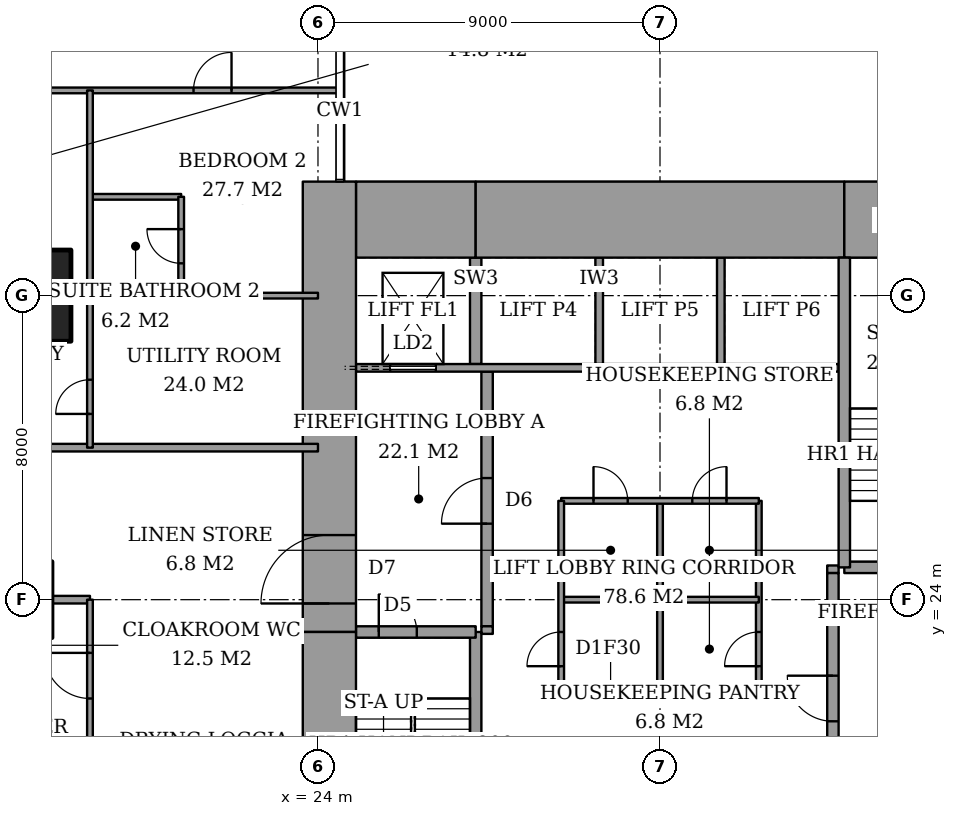
"""IFC4 building model, lengths in metres.
Left out: names, types, materials, properties, quantities, classifications, styles, units other than length and angle.
Written with IfcOpenShell. Run it as: python <this file> out.ifc"""

import sys

from ifc_helpers import new_model, si_unit, direction, frame, frame_2d, origin, origin_2d, place, context, subcontext, project, spatial, rectangle, extrude, element, fill, save


model = new_model("IFC4")
c1 = context("Model", 3, precision=1e-05, world=origin(), true_north=direction((0.0, 1.0)))
c2 = subcontext(c1, "Body", "Model", "MODEL_VIEW")
j1 = project(units=[si_unit("LENGTHUNIT", "METRE"), si_unit("PLANEANGLEUNIT", "RADIAN")], contexts=[c1])
p1 = place(None, origin())
s1 = spatial("IfcSite", under=j1, at=p1, CompositionType="ELEMENT")
p2 = place(p1, origin())
s2 = spatial("IfcBuilding", under=s1, at=p2, CompositionType="ELEMENT")
p3 = place(p2, frame((0.0, 0.0, 80.0)))
s3 = spatial("IfcBuildingStorey", under=s2, at=p3, CompositionType="ELEMENT", Elevation=80.0)
p4 = place(p3, frame((16.0, 32.0, 0.0), z_axis=(0.0, 0.0, 1.0), x_axis=(1.0, 0.0, 0.0)))
e1 = element("IfcColumn", 1, at=p4, inside=s3, PredefinedType="COLUMN", context=c2, shape_type="SweptSolid", body=[
    extrude(rectangle(XDim=3.0, YDim=2.4, at=origin_2d()), origin(), (0.0, 0.0, 1.0), 3.6),
])
p5 = place(p3, frame((25.0, 34.0, 0.0), z_axis=(0.0, 0.0, 1.0), x_axis=(1.0, 0.0, 0.0)))
e2 = element("IfcWall", 2, at=p5, inside=s3, PredefinedType="SHEAR", context=c2, shape_type="SweptSolid", body=[
    extrude(rectangle(XDim=3.15, YDim=2.0, at=frame_2d((1.575, 0.0))), origin(), (0.0, 0.0, 1.0), 3.6),
])
p6 = place(p3, frame((28.15, 34.0, 0.0), z_axis=(0.0, 0.0, 1.0), x_axis=(1.0, 0.0, 0.0)))
e3 = element("IfcWall", 3, at=p6, inside=s3, PredefinedType="SHEAR", context=c2, shape_type="SweptSolid", body=[
    extrude(rectangle(XDim=9.7, YDim=2.0, at=frame_2d((4.85, 0.0))), origin(), (0.0, 0.0, 1.0), 3.6),
])
p7 = place(p3, frame((37.85, 34.0, 0.0), z_axis=(0.0, 0.0, 1.0), x_axis=(1.0, 0.0, 0.0)))
e4 = element("IfcWall", 4, at=p7, inside=s3, PredefinedType="SHEAR", context=c2, shape_type="SweptSolid", body=[
    extrude(rectangle(XDim=3.15, YDim=2.0, at=frame_2d((1.575, 0.0))), origin(), (0.0, 0.0, 1.0), 3.6),
])
p8 = place(p3, frame((24.3, 13.0, 0.0), z_axis=(0.0, 0.0, 1.0), x_axis=(0.0, 1.0, 0.0)))
e5 = element("IfcWall", 5, at=p8, inside=s3, PredefinedType="SHEAR", context=c2, shape_type="SweptSolid", body=[
    extrude(rectangle(XDim=10.15, YDim=1.4, at=frame_2d((5.075, 0.0))), origin(), (0.0, 0.0, 1.0), 3.6),
])
p9 = place(p3, frame((24.3, 23.15, 0.0), z_axis=(0.0, 0.0, 1.0), x_axis=(0.0, 1.0, 0.0)))
e6 = element("IfcWall", 6, at=p9, inside=s3, PredefinedType="SHEAR", context=c2, shape_type="SweptSolid", body=[
    extrude(rectangle(XDim=11.85, YDim=1.4, at=frame_2d((5.925, 0.0))), origin(), (0.0, 0.0, 1.0), 3.6),
])
p10 = place(p9, frame((0.75, 0.0, 0.0)))
e7 = element("IfcOpeningElement", 7, at=p10, cuts=e6, PredefinedType="OPENING", context=c2, shape_type="SweptSolid", body=[
    extrude(rectangle(XDim=1.8, YDim=2.4, at=frame_2d((0.9, 1.2))), frame((0.0, 0.71, 0.0), z_axis=(0.0, -1.0, 0.0), x_axis=(1.0, 0.0, 0.0)), (0.0, 0.0, 1.0), 1.42),
])
p11 = place(p3, frame((28.15, 15.0, 0.0), z_axis=(0.0, 0.0, 1.0), x_axis=(0.0, 1.0, 0.0)))
e8 = element("IfcWall", 8, at=p11, inside=s3, PredefinedType="SHEAR", context=c2, shape_type="SweptSolid", body=[
    extrude(rectangle(XDim=8.15, YDim=0.3, at=frame_2d((4.075, 0.0))), origin(), (0.0, 0.0, 1.0), 3.6),
])
p12 = place(p3, frame((25.0, 23.15, 0.0), z_axis=(0.0, 0.0, 1.0), x_axis=(1.0, 0.0, 0.0)))
e9 = element("IfcWall", 9, at=p12, inside=s3, PredefinedType="SHEAR", context=c2, shape_type="SweptSolid", body=[
    extrude(rectangle(XDim=3.15, YDim=0.3, at=frame_2d((1.575, 0.0))), origin(), (0.0, 0.0, 1.0), 3.6),
])
p13 = place(p12, frame((0.6, 0.0, 0.0)))
e10 = element("IfcOpeningElement", 10, at=p13, cuts=e9, PredefinedType="OPENING", context=c2, shape_type="SweptSolid", body=[
    extrude(rectangle(XDim=1.0, YDim=2.1, at=frame_2d((0.5, 1.05))), frame((0.0, 0.16, 0.0), z_axis=(0.0, -1.0, 0.0), x_axis=(1.0, 0.0, 0.0)), (0.0, 0.0, 1.0), 0.32),
])
p14 = place(p3, frame((37.85, 24.85, 0.0), z_axis=(0.0, 0.0, 1.0), x_axis=(0.0, 1.0, 0.0)))
e11 = element("IfcWall", 11, at=p14, inside=s3, PredefinedType="SHEAR", context=c2, shape_type="SweptSolid", body=[
    extrude(rectangle(XDim=8.15, YDim=0.3, at=frame_2d((4.075, 0.0))), origin(), (0.0, 0.0, 1.0), 3.6),
])
p15 = place(p3, frame((37.85, 24.85, 0.0), z_axis=(0.0, 0.0, 1.0), x_axis=(1.0, 0.0, 0.0)))
e12 = element("IfcWall", 12, at=p15, inside=s3, PredefinedType="SHEAR", context=c2, shape_type="SweptSolid", body=[
    extrude(rectangle(XDim=3.15, YDim=0.3, at=frame_2d((1.575, 0.0))), origin(), (0.0, 0.0, 1.0), 3.6),
])
p16 = place(p15, frame((0.95, 0.0, 0.0)))
e13 = element("IfcOpeningElement", 13, at=p16, cuts=e12, PredefinedType="OPENING", context=c2, shape_type="SweptSolid", body=[
    extrude(rectangle(XDim=1.0, YDim=2.1, at=frame_2d((0.5, 1.05))), frame((0.0, 0.16, 0.0), z_axis=(0.0, -1.0, 0.0), x_axis=(1.0, 0.0, 0.0)), (0.0, 0.0, 1.0), 0.32),
])
p17 = place(p3, frame((28.45, 23.3, 0.0), z_axis=(0.0, 0.0, 1.0), x_axis=(0.0, 1.0, 0.0)))
e14 = element("IfcWall", 14, at=p17, inside=s3, PredefinedType="PARTITIONING", context=c2, shape_type="SweptSolid", body=[
    extrude(rectangle(XDim=6.7, YDim=0.3, at=frame_2d((3.35, 0.0))), origin(), (0.0, 0.0, 1.0), 3.6),
])
p18 = place(p17, frame((2.7, 0.0, 0.0)))
e15 = element("IfcOpeningElement", 15, at=p18, cuts=e14, PredefinedType="OPENING", context=c2, shape_type="SweptSolid", body=[
    extrude(rectangle(XDim=1.2, YDim=2.1, at=frame_2d((0.6, 1.05))), frame((0.0, 0.16, 0.0), z_axis=(0.0, -1.0, 0.0), x_axis=(1.0, 0.0, 0.0)), (0.0, 0.0, 1.0), 0.32),
])
p19 = place(p3, frame((37.55, 18.0, 0.0), z_axis=(0.0, 0.0, 1.0), x_axis=(0.0, 1.0, 0.0)))
e16 = element("IfcWall", 16, at=p19, inside=s3, PredefinedType="PARTITIONING", context=c2, shape_type="SweptSolid", body=[
    extrude(rectangle(XDim=6.7, YDim=0.3, at=frame_2d((3.35, 0.0))), origin(), (0.0, 0.0, 1.0), 3.6),
])
p20 = place(p19, frame((2.8, 0.0, 0.0)))
e17 = element("IfcOpeningElement", 17, at=p20, cuts=e16, PredefinedType="OPENING", context=c2, shape_type="SweptSolid", body=[
    extrude(rectangle(XDim=1.2, YDim=2.1, at=frame_2d((0.6, 1.05))), frame((0.0, 0.16, 0.0), z_axis=(0.0, -1.0, 0.0), x_axis=(1.0, 0.0, 0.0)), (0.0, 0.0, 1.0), 0.32),
])
p21 = place(p3, frame((17.0, 24.0, 0.0), z_axis=(0.0, 0.0, 1.0), x_axis=(1.0, 0.0, 0.0)))
e18 = element("IfcWall", 18, at=p21, inside=s3, PredefinedType="PARTITIONING", context=c2, shape_type="SweptSolid", body=[
    extrude(rectangle(XDim=1.0, YDim=0.2, at=frame_2d((0.5, 0.0))), origin(), (0.0, 0.0, 1.0), 3.35),
])
p22 = place(p3, frame((6.725, 28.0, 0.0), z_axis=(0.0, 0.0, 1.0), x_axis=(1.0, 0.0, 0.0)))
e19 = element("IfcWall", 19, at=p22, inside=s3, PredefinedType="PARTITIONING", context=c2, shape_type="SweptSolid", body=[
    extrude(rectangle(XDim=17.275, YDim=0.2, at=frame_2d((8.637, 0.0))), origin(), (0.0, 0.0, 1.0), 3.35),
])
p23 = place(p22, frame((6.675, 0.0, 0.0)))
e20 = element("IfcOpeningElement", 20, at=p23, cuts=e19, PredefinedType="OPENING", context=c2, shape_type="SweptSolid", body=[
    extrude(rectangle(XDim=1.2, YDim=2.4, at=frame_2d((0.6, 1.2))), frame((0.0, 0.11, 0.0), z_axis=(0.0, -1.0, 0.0), x_axis=(1.0, 0.0, 0.0)), (0.0, 0.0, 1.0), 0.22),
])
p24 = place(p3, frame((18.0, 32.0, 0.0), z_axis=(0.0, 0.0, 1.0), x_axis=(1.0, 0.0, 0.0)))
e21 = element("IfcWall", 21, at=p24, inside=s3, PredefinedType="PARTITIONING", context=c2, shape_type="SweptSolid", body=[
    extrude(rectangle(XDim=6.0, YDim=0.15, at=frame_2d((3.0, 0.0))), origin(), (0.0, 0.0, 1.0), 2.634),
])
p25 = place(p3, frame((17.5, 32.1, 0.0), z_axis=(0.0, 0.0, 1.0), x_axis=(1.0, 0.0, 0.0)))
e22 = element("IfcWall", 22, at=p25, inside=s3, PredefinedType="PARTITIONING", context=c2, shape_type="SweptSolid", body=[
    extrude(rectangle(XDim=0.5, YDim=0.15, at=frame_2d((0.25, 0.0))), origin(), (0.0, 0.0, 1.0), 2.634),
])
p26 = place(p3, frame((18.0, 34.6, 0.0), z_axis=(0.0, 0.0, 1.0), x_axis=(1.0, 0.0, 0.0)))
e23 = element("IfcWall", 23, at=p26, inside=s3, PredefinedType="PARTITIONING", context=c2, shape_type="SweptSolid", body=[
    extrude(rectangle(XDim=2.4, YDim=0.15, at=frame_2d((1.2, 0.0))), origin(), (0.0, 0.0, 1.0), 3.35),
])
p27 = place(p3, frame((10.0, 37.4, 0.0), z_axis=(0.0, 0.0, 1.0), x_axis=(1.0, 0.0, 0.0)))
e24 = element("IfcWall", 24, at=p27, inside=s3, PredefinedType="PARTITIONING", context=c2, shape_type="SweptSolid", body=[
    extrude(rectangle(XDim=14.561, YDim=0.15, at=frame_2d((7.281, 0.0))), origin(), (0.0, 0.0, 1.0), 3.35),
])
p28 = place(p27, frame((0.6, 0.0, 0.0)))
e25 = element("IfcOpeningElement", 25, at=p28, cuts=e24, PredefinedType="OPENING", context=c2, shape_type="SweptSolid", body=[
    extrude(rectangle(XDim=1.0, YDim=2.1, at=frame_2d((0.5, 1.05))), frame((0.0, 0.085, 0.0), z_axis=(0.0, -1.0, 0.0), x_axis=(1.0, 0.0, 0.0)), (0.0, 0.0, 1.0), 0.17),
])
p29 = place(p27, frame((4.6, 0.0, 0.0)))
e26 = element("IfcOpeningElement", 26, at=p29, cuts=e24, PredefinedType="OPENING", context=c2, shape_type="SweptSolid", body=[
    extrude(rectangle(XDim=1.0, YDim=2.1, at=frame_2d((0.5, 1.05))), frame((0.0, 0.085, 0.0), z_axis=(0.0, -1.0, 0.0), x_axis=(1.0, 0.0, 0.0)), (0.0, 0.0, 1.0), 0.17),
])
p30 = place(p27, frame((10.725, 0.0, 0.0)))
e27 = element("IfcOpeningElement", 27, at=p30, cuts=e24, PredefinedType="OPENING", context=c2, shape_type="SweptSolid", body=[
    extrude(rectangle(XDim=1.0, YDim=2.1, at=frame_2d((0.5, 1.05))), frame((0.0, 0.085, 0.0), z_axis=(0.0, -1.0, 0.0), x_axis=(1.0, 0.0, 0.0)), (0.0, 0.0, 1.0), 0.17),
])
p31 = place(p3, frame((18.0, 10.6, 0.0), z_axis=(0.0, 0.0, 1.0), x_axis=(0.0, 1.0, 0.0)))
e28 = element("IfcWall", 28, at=p31, inside=s3, PredefinedType="PARTITIONING", context=c2, shape_type="SweptSolid", body=[
    extrude(rectangle(XDim=13.4, YDim=0.15, at=frame_2d((6.7, 0.0))), origin(), (0.0, 0.0, 1.0), 3.35),
])
p32 = place(p31, frame((10.8, 0.0, 0.0)))
e29 = element("IfcOpeningElement", 29, at=p32, cuts=e28, PredefinedType="OPENING", context=c2, shape_type="SweptSolid", body=[
    extrude(rectangle(XDim=1.2, YDim=2.4, at=frame_2d((0.6, 1.2))), frame((0.0, 0.085, 0.0), z_axis=(0.0, -1.0, 0.0), x_axis=(1.0, 0.0, 0.0)), (0.0, 0.0, 1.0), 0.17),
])
p33 = place(p31, frame((7.25, 0.0, 0.0)))
e30 = element("IfcOpeningElement", 30, at=p33, cuts=e28, PredefinedType="OPENING", context=c2, shape_type="SweptSolid", body=[
    extrude(rectangle(XDim=0.9, YDim=2.1, at=frame_2d((0.45, 1.05))), frame((0.0, 0.085, 0.0), z_axis=(0.0, -1.0, 0.0), x_axis=(1.0, 0.0, 0.0)), (0.0, 0.0, 1.0), 0.17),
])
p34 = place(p3, frame((18.0, 28.0, 0.0), z_axis=(0.0, 0.0, 1.0), x_axis=(0.0, 1.0, 0.0)))
e31 = element("IfcWall", 31, at=p34, inside=s3, PredefinedType="PARTITIONING", context=c2, shape_type="SweptSolid", body=[
    extrude(rectangle(XDim=9.4, YDim=0.15, at=frame_2d((4.7, 0.0))), origin(), (0.0, 0.0, 1.0), 3.35),
])
p35 = place(p34, frame((0.887, 0.0, 0.0)))
e32 = element("IfcOpeningElement", 32, at=p35, cuts=e31, PredefinedType="OPENING", context=c2, shape_type="SweptSolid", body=[
    extrude(rectangle(XDim=0.9, YDim=2.1, at=frame_2d((0.45, 1.05))), frame((0.0, 0.085, 0.0), z_axis=(0.0, -1.0, 0.0), x_axis=(1.0, 0.0, 0.0)), (0.0, 0.0, 1.0), 0.17),
])
p36 = place(p3, frame((20.4, 32.0, 0.0), z_axis=(0.0, 0.0, 1.0), x_axis=(0.0, 1.0, 0.0)))
e33 = element("IfcWall", 33, at=p36, inside=s3, PredefinedType="PARTITIONING", context=c2, shape_type="SweptSolid", body=[
    extrude(rectangle(XDim=2.6, YDim=0.15, at=frame_2d((1.3, 0.0))), origin(), (0.0, 0.0, 1.0), 3.35),
])
p37 = place(p36, frame((0.85, 0.0, 0.0)))
e34 = element("IfcOpeningElement", 34, at=p37, cuts=e33, PredefinedType="OPENING", context=c2, shape_type="SweptSolid", body=[
    extrude(rectangle(XDim=0.9, YDim=2.1, at=frame_2d((0.45, 1.05))), frame((0.0, 0.085, 0.0), z_axis=(0.0, -1.0, 0.0), x_axis=(1.0, 0.0, 0.0)), (0.0, 0.0, 1.0), 0.17),
])
p38 = place(p3, frame((25.0, 30.1, 0.0), z_axis=(0.0, 0.0, 1.0), x_axis=(1.0, 0.0, 0.0)))
e35 = element("IfcWall", 35, at=p38, inside=s3, PredefinedType="PARTITIONING", context=c2, shape_type="SweptSolid", body=[
    extrude(rectangle(XDim=12.7, YDim=0.2, at=frame_2d((6.35, 0.0))), origin(), (0.0, 0.0, 1.0), 3.6),
])
p39 = place(p38, frame((0.9, 0.0, 0.0)))
e36 = element("IfcOpeningElement", 36, at=p39, cuts=e35, PredefinedType="OPENING", context=c2, shape_type="SweptSolid", body=[
    extrude(rectangle(XDim=1.2, YDim=2.1, at=frame_2d((0.6, 1.05))), frame((0.0, 0.11, 0.0), z_axis=(0.0, -1.0, 0.0), x_axis=(1.0, 0.0, 0.0)), (0.0, 0.0, 1.0), 0.22),
])
for number, where, z_axis, x_axis in (
    (37, (31.4, 30.2, 0.0), (0.0, 0.0, 1.0), (0.0, 1.0, 0.0)),
    (38, (34.6, 30.2, 0.0), (0.0, 0.0, 1.0), (0.0, 1.0, 0.0)),
):
    element("IfcWall", number, at=place(p3, frame(where, z_axis=z_axis, x_axis=x_axis)), inside=s3, PredefinedType="PARTITIONING", context=c2, shape_type="SweptSolid", body=[
        extrude(rectangle(XDim=2.8, YDim=0.2, at=frame_2d((1.4, 0.0))), origin(), (0.0, 0.0, 1.0), 3.6),
    ])
p40 = place(p3, frame((28.15, 30.2, 0.0), z_axis=(0.0, 0.0, 1.0), x_axis=(0.0, 1.0, 0.0)))
e39 = element("IfcWall", 39, at=p40, inside=s3, PredefinedType="SHEAR", context=c2, shape_type="SweptSolid", body=[
    extrude(rectangle(XDim=2.8, YDim=0.3, at=frame_2d((1.4, 0.0))), origin(), (0.0, 0.0, 1.0), 3.6),
])
for number, where, z_axis, x_axis in (
    (40, (28.3, 23.2, 0.0), (0.0, 0.0, 1.0), (1.0, 0.0, 0.0)),
    (41, (37.4, 24.8, 0.0), (0.0, 0.0, 1.0), (1.0, 0.0, 0.0)),
):
    element("IfcWall", number, at=place(p3, frame(where, z_axis=z_axis, x_axis=x_axis)), inside=s3, PredefinedType="PARTITIONING", context=c2, shape_type="SweptSolid", body=[
        extrude(rectangle(XDim=0.3, YDim=0.2, at=frame_2d((0.15, 0.0))), origin(), (0.0, 0.0, 1.0), 3.6),
    ])
p41 = place(p3, frame((30.4, 21.4, 0.0), z_axis=(0.0, 0.0, 1.0), x_axis=(1.0, 0.0, 0.0)))
e42 = element("IfcWall", 42, at=p41, inside=s3, PredefinedType="PARTITIONING", context=c2, shape_type="SweptSolid", body=[
    extrude(rectangle(XDim=5.2, YDim=0.15, at=frame_2d((2.6, 0.0))), origin(), (0.0, 0.0, 1.0), 3.35),
])
p42 = place(p3, frame((30.4, 26.6, 0.0), z_axis=(0.0, 0.0, 1.0), x_axis=(1.0, 0.0, 0.0)))
e43 = element("IfcWall", 43, at=p42, inside=s3, PredefinedType="PARTITIONING", context=c2, shape_type="SweptSolid", body=[
    extrude(rectangle(XDim=5.2, YDim=0.15, at=frame_2d((2.6, 0.0))), origin(), (0.0, 0.0, 1.0), 3.35),
])
p43 = place(p42, frame((0.85, 0.0, 0.0)))
e44 = element("IfcOpeningElement", 44, at=p43, cuts=e43, PredefinedType="OPENING", context=c2, shape_type="SweptSolid", body=[
    extrude(rectangle(XDim=0.9, YDim=2.1, at=frame_2d((0.45, 1.05))), frame((0.0, 0.085, 0.0), z_axis=(0.0, -1.0, 0.0), x_axis=(1.0, 0.0, 0.0)), (0.0, 0.0, 1.0), 0.17),
])
p44 = place(p42, frame((3.45, 0.0, 0.0)))
e45 = element("IfcOpeningElement", 45, at=p44, cuts=e43, PredefinedType="OPENING", context=c2, shape_type="SweptSolid", body=[
    extrude(rectangle(XDim=0.9, YDim=2.1, at=frame_2d((0.45, 1.05))), frame((0.0, 0.085, 0.0), z_axis=(0.0, -1.0, 0.0), x_axis=(1.0, 0.0, 0.0)), (0.0, 0.0, 1.0), 0.17),
])
p45 = place(p3, frame((30.4, 21.4, 0.0), z_axis=(0.0, 0.0, 1.0), x_axis=(0.0, 1.0, 0.0)))
e46 = element("IfcWall", 46, at=p45, inside=s3, PredefinedType="PARTITIONING", context=c2, shape_type="SweptSolid", body=[
    extrude(rectangle(XDim=5.2, YDim=0.15, at=frame_2d((2.6, 0.0))), origin(), (0.0, 0.0, 1.0), 3.35),
])
p46 = place(p45, frame((0.85, 0.0, 0.0)))
e47 = element("IfcOpeningElement", 47, at=p46, cuts=e46, PredefinedType="OPENING", context=c2, shape_type="SweptSolid", body=[
    extrude(rectangle(XDim=0.9, YDim=2.1, at=frame_2d((0.45, 1.05))), frame((0.0, 0.085, 0.0), z_axis=(0.0, -1.0, 0.0), x_axis=(1.0, 0.0, 0.0)), (0.0, 0.0, 1.0), 0.17),
])
p47 = place(p3, frame((35.6, 21.4, 0.0), z_axis=(0.0, 0.0, 1.0), x_axis=(0.0, 1.0, 0.0)))
e48 = element("IfcWall", 48, at=p47, inside=s3, PredefinedType="PARTITIONING", context=c2, shape_type="SweptSolid", body=[
    extrude(rectangle(XDim=5.2, YDim=0.15, at=frame_2d((2.6, 0.0))), origin(), (0.0, 0.0, 1.0), 3.35),
])
p48 = place(p47, frame((0.85, 0.0, 0.0)))
e49 = element("IfcOpeningElement", 49, at=p48, cuts=e48, PredefinedType="OPENING", context=c2, shape_type="SweptSolid", body=[
    extrude(rectangle(XDim=0.9, YDim=2.1, at=frame_2d((0.45, 1.05))), frame((0.0, 0.085, 0.0), z_axis=(0.0, -1.0, 0.0), x_axis=(1.0, 0.0, 0.0)), (0.0, 0.0, 1.0), 0.17),
])
for number, where, z_axis, x_axis in (
    (50, (30.4, 24.0, 0.0), (0.0, 0.0, 1.0), (1.0, 0.0, 0.0)),
    (51, (33.0, 21.4, 0.0), (0.0, 0.0, 1.0), (0.0, 1.0, 0.0)),
):
    element("IfcWall", number, at=place(p3, frame(where, z_axis=z_axis, x_axis=x_axis)), inside=s3, PredefinedType="PARTITIONING", context=c2, shape_type="SweptSolid", body=[
        extrude(rectangle(XDim=5.2, YDim=0.15, at=frame_2d((2.6, 0.0))), origin(), (0.0, 0.0, 1.0), 3.35),
    ])
p49 = place(p32, origin())
e52 = element("IfcDoor", 52, at=p49, inside=s3, OperationType="SINGLE_SWING_LEFT", PredefinedType="DOOR", context=c2, shape_type="SweptSolid", body=[
    extrude(rectangle(XDim=1.2, YDim=2.4, at=frame_2d((0.6, 1.2))), frame((0.0, 0.025, 0.0), z_axis=(0.0, -1.0, 0.0), x_axis=(1.0, 0.0, 0.0)), (0.0, 0.0, 1.0), 0.05),
])
fill(e29, e52)
p50 = place(p37, origin())
e53 = element("IfcDoor", 53, at=p50, inside=s3, OperationType="SINGLE_SWING_LEFT", PredefinedType="DOOR", context=c2, shape_type="SweptSolid", body=[
    extrude(rectangle(XDim=0.9, YDim=2.1, at=frame_2d((0.45, 1.05))), frame((0.0, 0.025, 0.0), z_axis=(0.0, -1.0, 0.0), x_axis=(1.0, 0.0, 0.0)), (0.0, 0.0, 1.0), 0.05),
])
fill(e34, e53)
p51 = place(p30, origin())
e54 = element("IfcDoor", 54, at=p51, inside=s3, OperationType="SINGLE_SWING_LEFT", PredefinedType="DOOR", context=c2, shape_type="SweptSolid", body=[
    extrude(rectangle(XDim=1.0, YDim=2.1, at=frame_2d((0.5, 1.05))), frame((0.0, 0.025, 0.0), z_axis=(0.0, -1.0, 0.0), x_axis=(1.0, 0.0, 0.0)), (0.0, 0.0, 1.0), 0.05),
])
fill(e27, e54)
p52 = place(p35, origin())
e55 = element("IfcDoor", 55, at=p52, inside=s3, OperationType="SINGLE_SWING_RIGHT", PredefinedType="DOOR", context=c2, shape_type="SweptSolid", body=[
    extrude(rectangle(XDim=0.9, YDim=2.1, at=frame_2d((0.45, 1.05))), frame((0.0, 0.025, 0.0), z_axis=(0.0, -1.0, 0.0), x_axis=(1.0, 0.0, 0.0)), (0.0, 0.0, 1.0), 0.05),
])
fill(e32, e55)
p53 = place(p13, origin())
e56 = element("IfcDoor", 56, at=p53, inside=s3, OperationType="SINGLE_SWING_RIGHT", PredefinedType="DOOR", context=c2, shape_type="SweptSolid", body=[
    extrude(rectangle(XDim=1.0, YDim=2.1, at=frame_2d((0.5, 1.05))), frame((0.0, 0.025, 0.0), z_axis=(0.0, -1.0, 0.0), x_axis=(1.0, 0.0, 0.0)), (0.0, 0.0, 1.0), 0.05),
])
fill(e10, e56)
p54 = place(p18, origin())
e57 = element("IfcDoor", 57, at=p54, inside=s3, OperationType="SINGLE_SWING_RIGHT", PredefinedType="DOOR", context=c2, shape_type="SweptSolid", body=[
    extrude(rectangle(XDim=1.2, YDim=2.1, at=frame_2d((0.6, 1.05))), frame((0.0, 0.025, 0.0), z_axis=(0.0, -1.0, 0.0), x_axis=(1.0, 0.0, 0.0)), (0.0, 0.0, 1.0), 0.05),
])
fill(e15, e57)
p55 = place(p20, origin())
e58 = element("IfcDoor", 58, at=p55, inside=s3, OperationType="SINGLE_SWING_LEFT", PredefinedType="DOOR", context=c2, shape_type="SweptSolid", body=[
    extrude(rectangle(XDim=1.2, YDim=2.1, at=frame_2d((0.6, 1.05))), frame((0.0, 0.025, 0.0), z_axis=(0.0, -1.0, 0.0), x_axis=(1.0, 0.0, 0.0)), (0.0, 0.0, 1.0), 0.05),
])
fill(e17, e58)
p56 = place(p10, origin())
e59 = element("IfcDoor", 59, at=p56, inside=s3, OperationType="DOUBLE_DOOR_DOUBLE_SWING", PredefinedType="DOOR", context=c2, shape_type="SweptSolid", body=[
    extrude(rectangle(XDim=1.8, YDim=2.4, at=frame_2d((0.9, 1.2))), frame((0.0, 0.025, 0.0), z_axis=(0.0, -1.0, 0.0), x_axis=(1.0, 0.0, 0.0)), (0.0, 0.0, 1.0), 0.05),
])
fill(e7, e59)
p57 = place(p46, origin())
e60 = element("IfcDoor", 60, at=p57, inside=s3, OperationType="SINGLE_SWING_RIGHT", PredefinedType="DOOR", context=c2, shape_type="SweptSolid", body=[
    extrude(rectangle(XDim=0.9, YDim=2.1, at=frame_2d((0.45, 1.05))), frame((0.0, 0.025, 0.0), z_axis=(0.0, -1.0, 0.0), x_axis=(1.0, 0.0, 0.0)), (0.0, 0.0, 1.0), 0.05),
])
fill(e47, e60)
p58 = place(p48, origin())
e61 = element("IfcDoor", 61, at=p58, inside=s3, OperationType="SINGLE_SWING_RIGHT", PredefinedType="DOOR", context=c2, shape_type="SweptSolid", body=[
    extrude(rectangle(XDim=0.9, YDim=2.1, at=frame_2d((0.45, 1.05))), frame((0.0, 0.025, 0.0), z_axis=(0.0, -1.0, 0.0), x_axis=(1.0, 0.0, 0.0)), (0.0, 0.0, 1.0), 0.05),
])
fill(e49, e61)
p59 = place(p43, origin())
e62 = element("IfcDoor", 62, at=p59, inside=s3, OperationType="SINGLE_SWING_RIGHT", PredefinedType="DOOR", context=c2, shape_type="SweptSolid", body=[
    extrude(rectangle(XDim=0.9, YDim=2.1, at=frame_2d((0.45, 1.05))), frame((0.0, 0.025, 0.0), z_axis=(0.0, -1.0, 0.0), x_axis=(1.0, 0.0, 0.0)), (0.0, 0.0, 1.0), 0.05),
])
fill(e44, e62)
p60 = place(p44, origin())
e63 = element("IfcDoor", 63, at=p60, inside=s3, OperationType="SINGLE_SWING_LEFT", PredefinedType="DOOR", context=c2, shape_type="SweptSolid", body=[
    extrude(rectangle(XDim=0.9, YDim=2.1, at=frame_2d((0.45, 1.05))), frame((0.0, 0.025, 0.0), z_axis=(0.0, -1.0, 0.0), x_axis=(1.0, 0.0, 0.0)), (0.0, 0.0, 1.0), 0.05),
])
fill(e45, e63)
p61 = place(p39, origin())
e64 = element("IfcDoor", 64, at=p61, inside=s3, OperationType="SLIDING_TO_LEFT", PredefinedType="DOOR", context=c2, shape_type="SweptSolid", body=[
    extrude(rectangle(XDim=1.2, YDim=2.1, at=frame_2d((0.6, 1.05))), frame((0.0, 0.025, 0.0), z_axis=(0.0, -1.0, 0.0), x_axis=(1.0, 0.0, 0.0)), (0.0, 0.0, 1.0), 0.05),
])
fill(e36, e64)
save(model, sys.argv[1])
